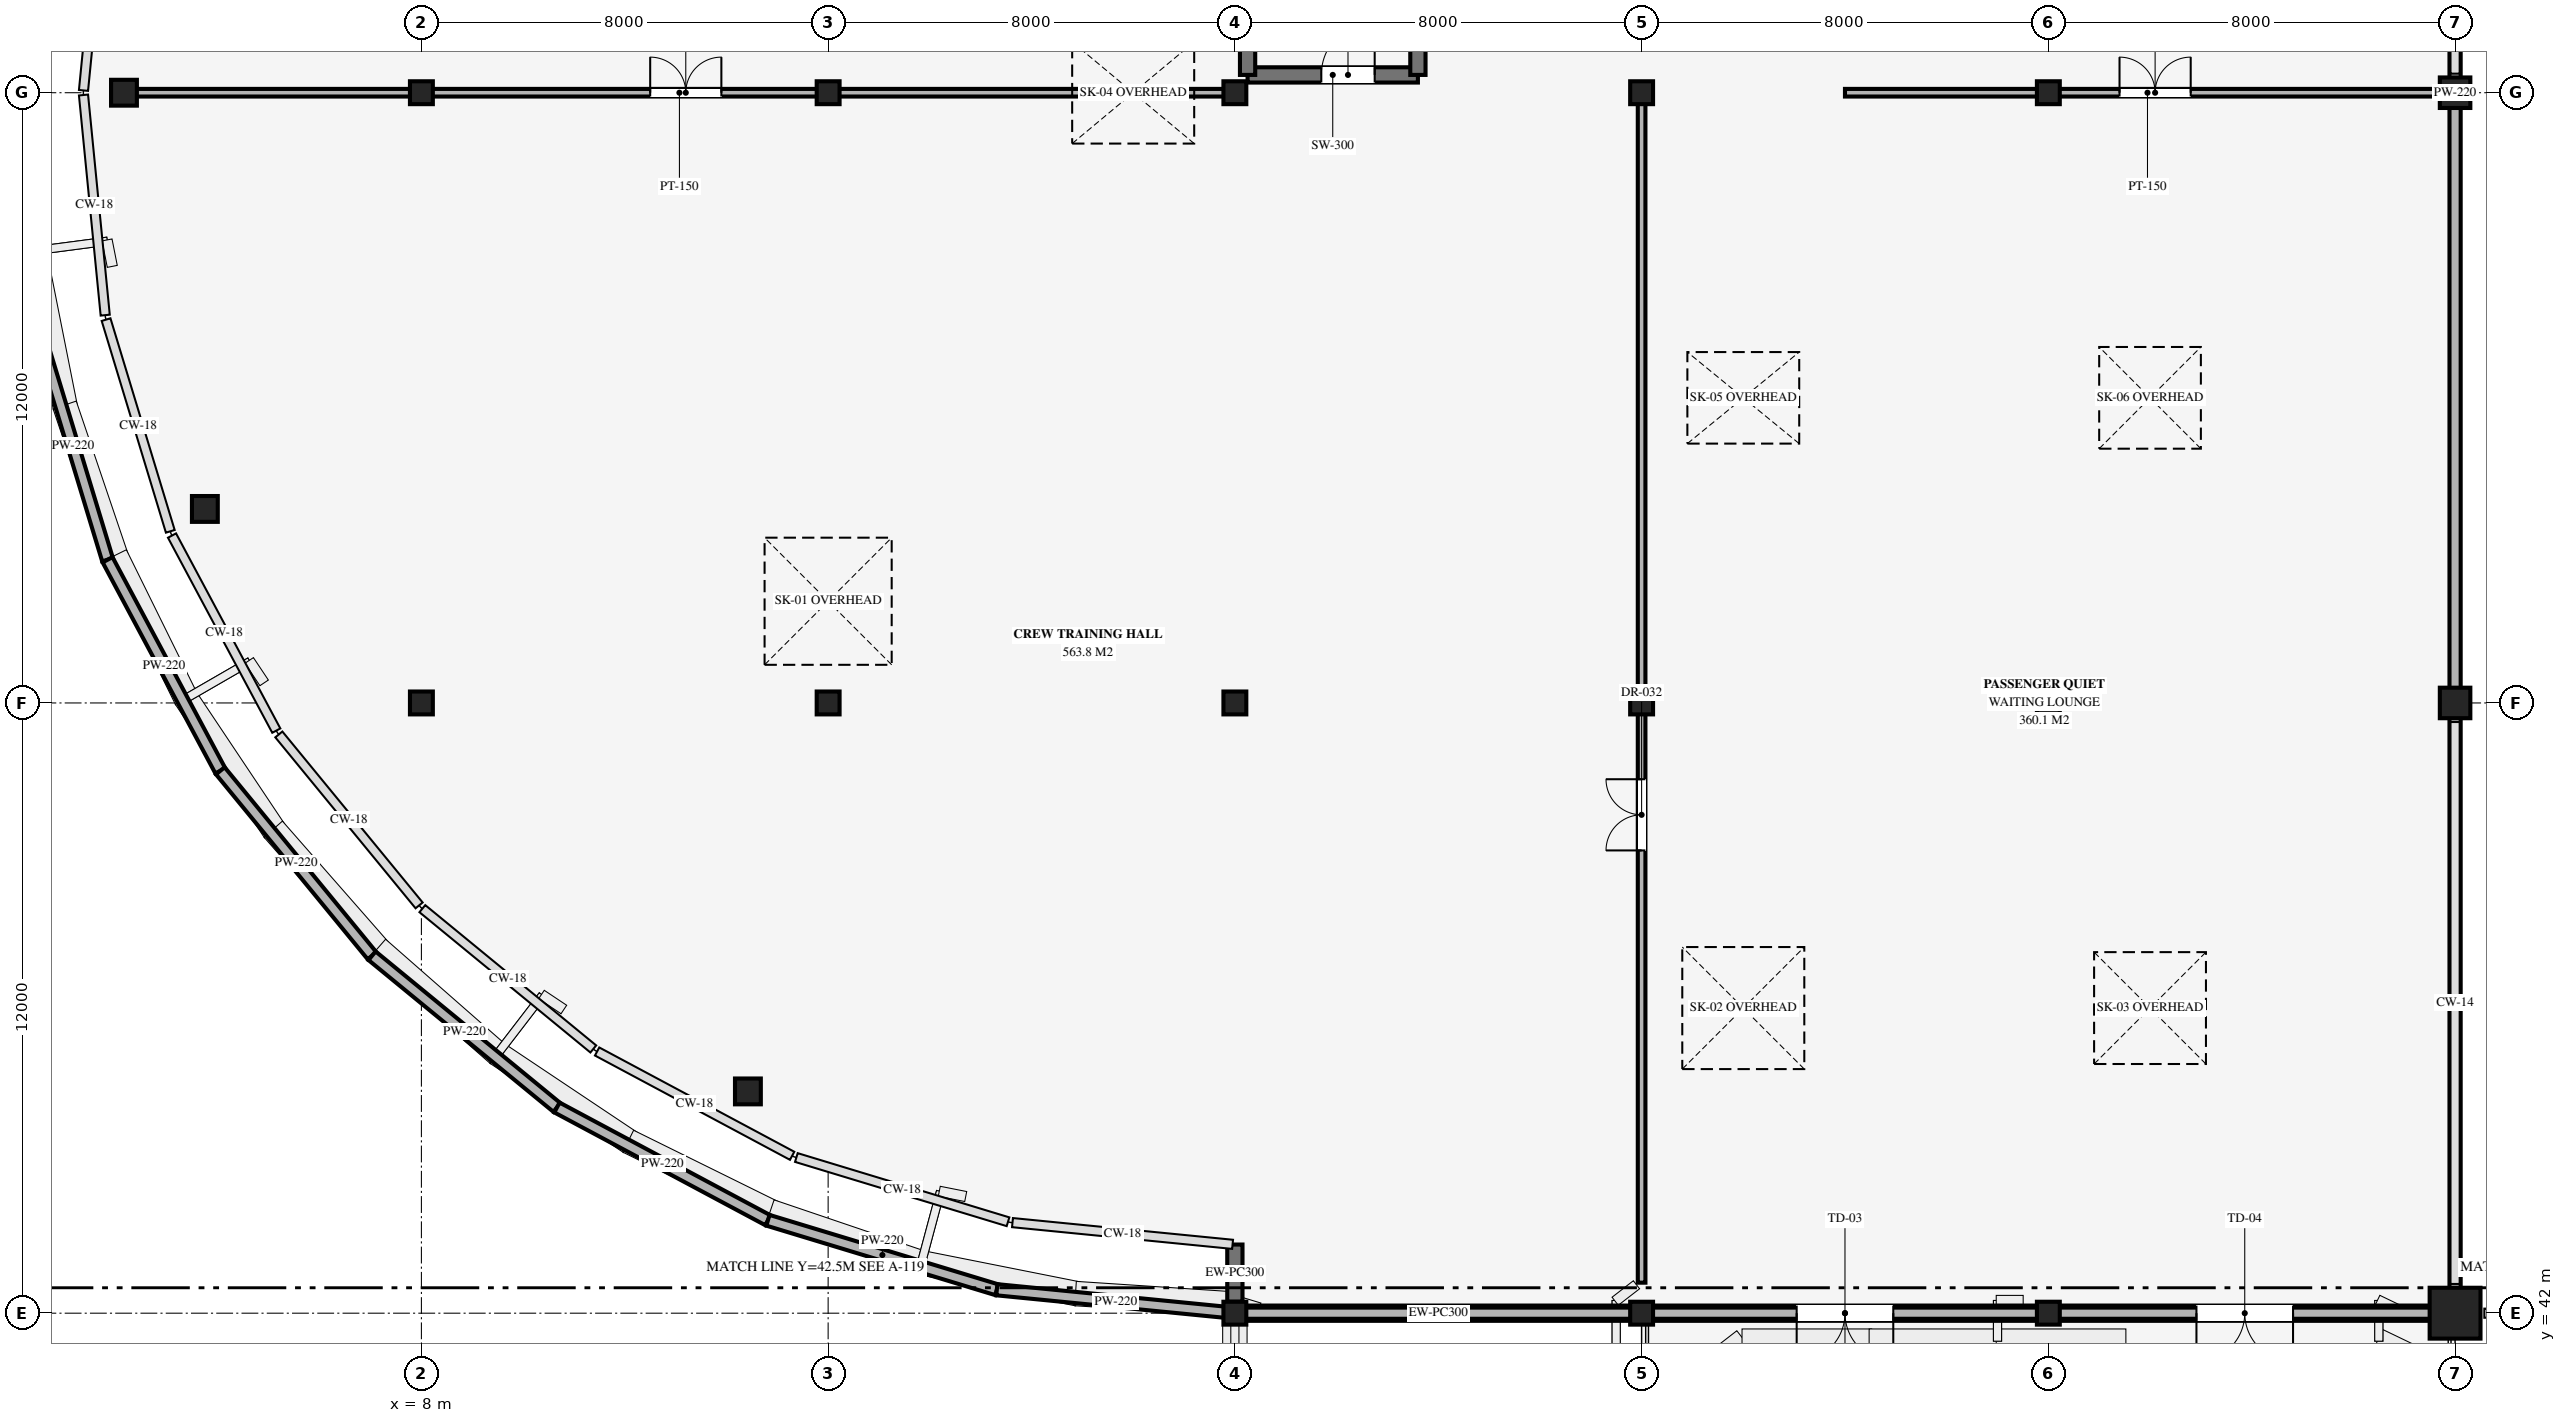
"""IFC4 building model, lengths in metres.
Left out: names, types, materials, properties, quantities, classifications, styles, units other than length and angle.
Written with IfcOpenShell. Run it as: python <this file> out.ifc"""

import sys

from ifc_helpers import new_model, si_unit, direction, frame, frame_2d, origin, origin_2d, place, context, subcontext, project, spatial, rectangle, circle, hollow_circle, extrude, element, fill, save


model = new_model("IFC4")
c1 = context("Model", 3, precision=1e-05, world=origin(), true_north=direction((0.0, 1.0)))
c2 = subcontext(c1, "Body", "Model", "MODEL_VIEW")
j1 = project(units=[si_unit("LENGTHUNIT", "METRE"), si_unit("PLANEANGLEUNIT", "RADIAN")], contexts=[c1])
p1 = place(None, origin())
s1 = spatial("IfcSite", under=j1, at=p1, CompositionType="ELEMENT")
p2 = place(p1, origin())
s2 = spatial("IfcBuilding", under=s1, at=p2, CompositionType="ELEMENT")
p3 = place(p2, frame((0.0, 0.0, 10.2)))
s3 = spatial("IfcBuildingStorey", under=s2, at=p3, CompositionType="ELEMENT", Elevation=10.2)
for number, where, z_axis, x_axis in (
    (1, (8.0, 54.0, 0.0), (0.0, 0.0, 1.0), (1.0, 0.0, 0.0)),
    (2, (8.0, 66.0, 0.0), (0.0, 0.0, 1.0), (1.0, 0.0, 0.0)),
    (3, (16.0, 54.0, 0.0), (0.0, 0.0, 1.0), (1.0, 0.0, 0.0)),
    (4, (16.0, 66.0, 0.0), (0.0, 0.0, 1.0), (1.0, 0.0, 0.0)),
    (5, (24.0, 42.0, 0.0), (0.0, 0.0, 1.0), (1.0, 0.0, 0.0)),
    (6, (24.0, 54.0, 0.0), (0.0, 0.0, 1.0), (1.0, 0.0, 0.0)),
    (7, (24.0, 66.0, 0.0), (0.0, 0.0, 1.0), (1.0, 0.0, 0.0)),
    (8, (32.0, 42.0, 0.0), (0.0, 0.0, 1.0), (1.0, 0.0, 0.0)),
    (9, (32.0, 54.0, 0.0), (0.0, 0.0, 1.0), (1.0, 0.0, 0.0)),
    (10, (32.0, 66.0, 0.0), (0.0, 0.0, 1.0), (1.0, 0.0, 0.0)),
    (11, (40.0, 42.0, 0.0), (0.0, 0.0, 1.0), (1.0, 0.0, 0.0)),
    (12, (40.0, 54.0, 0.0), (0.0, 0.0, 1.0), (1.0, 0.0, 0.0)),
    (13, (40.0, 66.0, 0.0), (0.0, 0.0, 1.0), (1.0, 0.0, 0.0)),
):
    element("IfcColumn", number, at=place(p3, frame(where, z_axis=z_axis, x_axis=x_axis)), inside=s3, PredefinedType="COLUMN", context=c2, shape_type="SweptSolid", body=[
        extrude(rectangle(XDim=0.45, YDim=0.45, at=origin_2d()), origin(), (0.0, 0.0, 1.0), 4.64),
    ])
p4 = place(p3, frame((48.0, 42.0, 0.0), z_axis=(0.0, 0.0, 1.0), x_axis=(1.0, 0.0, 0.0)))
e14 = element("IfcColumn", 14, at=p4, inside=s3, PredefinedType="COLUMN", context=c2, shape_type="SweptSolid", body=[
    extrude(rectangle(XDim=1.0, YDim=1.0, at=origin_2d()), origin(), (0.0, 0.0, 1.0), 4.8),
])
for number, where, z_axis, x_axis in (
    (15, (48.0, 54.0, 0.0), (0.0, 0.0, 1.0), (1.0, 0.0, 0.0)),
    (16, (48.0, 66.0, 0.0), (0.0, 0.0, 1.0), (1.0, 0.0, 0.0)),
):
    element("IfcColumn", number, at=place(p3, frame(where, z_axis=z_axis, x_axis=x_axis)), inside=s3, PredefinedType="COLUMN", context=c2, shape_type="SweptSolid", body=[
        extrude(circle(Radius=0.3, at=origin_2d()), origin(), (0.0, 0.0, 1.0), 4.64),
    ])
for number, where, z_axis, x_axis in (
    (17, (2.15, 66.0, 0.0), (0.0, 0.0, 1.0), (1.0, 0.0, 0.0)),
    (18, (3.741, 57.815, 0.0), (0.0, 0.0, 1.0), (1.0, 0.0, 0.0)),
    (19, (14.422, 46.361, 0.0), (0.0, 0.0, 1.0), (1.0, 0.0, 0.0)),
):
    element("IfcColumn", number, at=place(p3, frame(where, z_axis=z_axis, x_axis=x_axis)), inside=s3, PredefinedType="COLUMN", context=c2, shape_type="SweptSolid", body=[
        extrude(hollow_circle(Radius=0.254, WallThickness=0.02, at=origin_2d()), origin(), (0.0, 0.0, 1.0), 4.64),
    ])
p5 = place(p3, frame((24.0, 43.35, 0.0), z_axis=(0.0, 0.0, 1.0), x_axis=(0.0, -1.0, 0.0)))
e20 = element("IfcWall", 20, at=p5, inside=s3, PredefinedType="SOLIDWALL", context=c2, shape_type="SweptSolid", body=[
    extrude(rectangle(XDim=1.125, YDim=0.3, at=frame_2d((0.562, 0.0))), origin(), (0.0, 0.0, 1.0), 4.52),
])
p6 = place(p3, frame((31.775, 42.0, 0.0), z_axis=(0.0, 0.0, 1.0), x_axis=(-1.0, 0.0, 0.0)))
e21 = element("IfcWall", 21, at=p6, inside=s3, PredefinedType="SOLIDWALL", context=c2, shape_type="SweptSolid", body=[
    extrude(rectangle(XDim=7.55, YDim=0.3, at=frame_2d((3.775, 0.0))), origin(), (0.0, 0.0, 1.0), 4.52),
])
p7 = place(p3, frame((39.775, 42.0, 0.0), z_axis=(0.0, 0.0, 1.0), x_axis=(-1.0, 0.0, 0.0)))
e22 = element("IfcWall", 22, at=p7, inside=s3, PredefinedType="SOLIDWALL", context=c2, shape_type="SweptSolid", body=[
    extrude(rectangle(XDim=7.55, YDim=0.3, at=frame_2d((3.775, 0.0))), origin(), (0.0, 0.0, 1.0), 4.52),
])
p8 = place(p7, frame((2.825, 0.0, 0.0)))
e23 = element("IfcOpeningElement", 23, at=p8, cuts=e22, PredefinedType="OPENING", context=c2, shape_type="SweptSolid", body=[
    extrude(rectangle(XDim=1.9, YDim=2.2, at=frame_2d((0.95, 1.1))), frame((0.0, 0.16, 0.0), z_axis=(0.0, -1.0, 0.0), x_axis=(1.0, 0.0, 0.0)), (0.0, 0.0, 1.0), 0.32),
])
p9 = place(p3, frame((47.5, 42.0, 0.0), z_axis=(0.0, 0.0, 1.0), x_axis=(-1.0, 0.0, 0.0)))
e24 = element("IfcWall", 24, at=p9, inside=s3, PredefinedType="SOLIDWALL", context=c2, shape_type="SweptSolid", body=[
    extrude(rectangle(XDim=7.275, YDim=0.3, at=frame_2d((3.637, 0.0))), origin(), (0.0, 0.0, 1.0), 4.52),
])
p10 = place(p9, frame((2.687, 0.0, 0.0)))
e25 = element("IfcOpeningElement", 25, at=p10, cuts=e24, PredefinedType="OPENING", context=c2, shape_type="SweptSolid", body=[
    extrude(rectangle(XDim=1.9, YDim=2.2, at=frame_2d((0.95, 1.1))), frame((0.0, 0.16, 0.0), z_axis=(0.0, -1.0, 0.0), x_axis=(1.0, 0.0, 0.0)), (0.0, 0.0, 1.0), 0.32),
])
p11 = place(p3, frame((0.461, 61.318, 4.8), z_axis=(0.0, 0.0, 1.0), x_axis=(0.290331426072, -0.956926153386, 0.0)))
e26 = element("IfcWall", 26, at=p11, inside=s3, PredefinedType="PARAPET", context=c2, shape_type="SweptSolid", body=[
    extrude(rectangle(XDim=4.705, YDim=0.22, at=frame_2d((2.353, 0.0))), origin(), (0.0, 0.0, 1.0), 1.15),
])
p12 = place(p3, frame((1.827, 56.816, 4.8), z_axis=(0.0, 0.0, 1.0), x_axis=(0.471371704829, -0.881934643773, 0.0)))
e27 = element("IfcWall", 27, at=p12, inside=s3, PredefinedType="PARAPET", context=c2, shape_type="SweptSolid", body=[
    extrude(rectangle(XDim=4.706, YDim=0.22, at=frame_2d((2.353, 0.0))), origin(), (0.0, 0.0, 1.0), 1.15),
])
for number, where, z_axis, x_axis in (
    (28, (4.045, 52.666, 4.8), (0.0, 0.0, 1.0), (0.634, -0.773, 0.0)),
    (29, (7.029, 49.029, 4.8), (0.0, 0.0, 1.0), (0.773, -0.634, 0.0)),
):
    element("IfcWall", number, at=place(p3, frame(where, z_axis=z_axis, x_axis=x_axis)), inside=s3, PredefinedType="PARAPET", context=c2, shape_type="SweptSolid", body=[
        extrude(rectangle(XDim=4.705, YDim=0.22, at=frame_2d((2.352, 0.0))), origin(), (0.0, 0.0, 1.0), 1.15),
    ])
p13 = place(p3, frame((10.666, 46.045, 4.8), z_axis=(0.0, 0.0, 1.0), x_axis=(0.881934643773, -0.471371704829, 0.0)))
e30 = element("IfcWall", 30, at=p13, inside=s3, PredefinedType="PARAPET", context=c2, shape_type="SweptSolid", body=[
    extrude(rectangle(XDim=4.706, YDim=0.22, at=frame_2d((2.353, 0.0))), origin(), (0.0, 0.0, 1.0), 1.15),
])
p14 = place(p3, frame((14.816, 43.827, 4.8), z_axis=(0.0, 0.0, 1.0), x_axis=(0.956926153386, -0.290331426072, 0.0)))
e31 = element("IfcWall", 31, at=p14, inside=s3, PredefinedType="PARAPET", context=c2, shape_type="SweptSolid", body=[
    extrude(rectangle(XDim=4.705, YDim=0.22, at=frame_2d((2.353, 0.0))), origin(), (0.0, 0.0, 1.0), 1.15),
])
p15 = place(p3, frame((19.318, 42.461, 4.8), z_axis=(0.0, 0.0, 1.0), x_axis=(0.995188621889, -0.097977583466, 0.0)))
e32 = element("IfcWall", 32, at=p15, inside=s3, PredefinedType="PARAPET", context=c2, shape_type="SweptSolid", body=[
    extrude(rectangle(XDim=4.705, YDim=0.22, at=frame_2d((2.352, 0.0))), origin(), (0.0, 0.0, 1.0), 1.15),
])
p16 = place(p3, frame((24.0, 42.0, 4.8), z_axis=(0.0, 0.0, 1.0), x_axis=(1.0, 0.0, 0.0)))
e33 = element("IfcWall", 33, at=p16, inside=s3, PredefinedType="PARAPET", context=c2, shape_type="SweptSolid", body=[
    extrude(rectangle(XDim=24.0, YDim=0.22, at=frame_2d((12.0, 0.0))), origin(), (0.0, 0.0, 1.0), 1.15),
])
p17 = place(p3, frame((48.0, 42.0, 4.8), z_axis=(0.0, 0.0, 1.0), x_axis=(0.0, 1.0, 0.0)))
e34 = element("IfcWall", 34, at=p17, inside=s3, PredefinedType="PARAPET", context=c2, shape_type="SweptSolid", body=[
    extrude(rectangle(XDim=48.0, YDim=0.22, at=frame_2d((24.0, 0.0))), origin(), (0.0, 0.0, 1.0), 1.15),
])
p18 = place(p3, frame((24.25, 66.35, 0.0), z_axis=(0.0, 0.0, 1.0), x_axis=(1.0, 0.0, 0.0)))
e35 = element("IfcWall", 35, at=p18, inside=s3, PredefinedType="SHEAR", context=c2, shape_type="SweptSolid", body=[
    extrude(rectangle(XDim=3.35, YDim=0.3, at=frame_2d((1.675, 0.0))), origin(), (0.0, 0.0, 1.0), 4.78),
])
p19 = place(p18, frame((1.45, 0.0, 0.0)))
e36 = element("IfcOpeningElement", 36, at=p19, cuts=e35, PredefinedType="OPENING", context=c2, shape_type="SweptSolid", body=[
    extrude(rectangle(XDim=1.05, YDim=2.15, at=frame_2d((0.525, 1.075))), frame((0.0, 0.16, 0.0), z_axis=(0.0, -1.0, 0.0), x_axis=(1.0, 0.0, 0.0)), (0.0, 0.0, 1.0), 0.32),
])
for number, where, z_axis, x_axis in (
    (37, (24.25, 66.35, 0.0), (0.0, 0.0, 1.0), (0.0, 1.0, 0.0)),
    (38, (27.6, 66.35, 0.0), (0.0, 0.0, 1.0), (0.0, 1.0, 0.0)),
):
    element("IfcWall", number, at=place(p3, frame(where, z_axis=z_axis, x_axis=x_axis)), inside=s3, PredefinedType="SHEAR", context=c2, shape_type="SweptSolid", body=[
        extrude(rectangle(XDim=8.9, YDim=0.3, at=frame_2d((4.45, 0.0))), origin(), (0.0, 0.0, 1.0), 4.78),
    ])
p20 = place(p3, frame((32.0, 42.6, 0.0), z_axis=(0.0, 0.0, 1.0), x_axis=(0.0, 1.0, 0.0)))
e39 = element("IfcWall", 39, at=p20, inside=s3, PredefinedType="PARTITIONING", context=c2, shape_type="SweptSolid", body=[
    extrude(rectangle(XDim=23.4, YDim=0.15, at=frame_2d((11.7, 0.0))), origin(), (0.0, 0.0, 1.0), 3.65),
])
p21 = place(p20, frame((8.5, 0.0, 0.0)))
e40 = element("IfcOpeningElement", 40, at=p21, cuts=e39, PredefinedType="OPENING", context=c2, shape_type="SweptSolid", body=[
    extrude(rectangle(XDim=1.4, YDim=2.15, at=frame_2d((0.7, 1.075))), frame((0.0, 0.085, 0.0), z_axis=(0.0, -1.0, 0.0), x_axis=(1.0, 0.0, 0.0)), (0.0, 0.0, 1.0), 0.17),
])
p22 = place(p3, frame((2.0, 66.0, 0.0), z_axis=(0.0, 0.0, 1.0), x_axis=(1.0, 0.0, 0.0)))
e41 = element("IfcWall", 41, at=p22, inside=s3, PredefinedType="PARTITIONING", context=c2, shape_type="SweptSolid", body=[
    extrude(rectangle(XDim=22.15, YDim=0.15, at=frame_2d((11.075, 0.0))), origin(), (0.0, 0.0, 1.0), 3.65),
])
p23 = place(p22, frame((10.5, 0.0, 0.0)))
e42 = element("IfcOpeningElement", 42, at=p23, cuts=e41, PredefinedType="OPENING", context=c2, shape_type="SweptSolid", body=[
    extrude(rectangle(XDim=1.4, YDim=2.15, at=frame_2d((0.7, 1.075))), frame((0.0, 0.085, 0.0), z_axis=(0.0, -1.0, 0.0), x_axis=(1.0, 0.0, 0.0)), (0.0, 0.0, 1.0), 0.17),
])
p24 = place(p3, frame((36.0, 66.0, 0.0), z_axis=(0.0, 0.0, 1.0), x_axis=(1.0, 0.0, 0.0)))
e43 = element("IfcWall", 43, at=p24, inside=s3, PredefinedType="PARTITIONING", context=c2, shape_type="SweptSolid", body=[
    extrude(rectangle(XDim=11.9, YDim=0.15, at=frame_2d((5.95, 0.0))), origin(), (0.0, 0.0, 1.0), 3.65),
])
p25 = place(p24, frame((5.4, 0.0, 0.0)))
e44 = element("IfcOpeningElement", 44, at=p25, cuts=e43, PredefinedType="OPENING", context=c2, shape_type="SweptSolid", body=[
    extrude(rectangle(XDim=1.4, YDim=2.15, at=frame_2d((0.7, 1.075))), frame((0.0, 0.085, 0.0), z_axis=(0.0, -1.0, 0.0), x_axis=(1.0, 0.0, 0.0)), (0.0, 0.0, 1.0), 0.17),
])
p26 = place(p8, origin())
e45 = element("IfcDoor", 45, at=p26, inside=s3, OperationType="DOUBLE_DOOR_SINGLE_SWING", PredefinedType="DOOR", context=c2, shape_type="SweptSolid", body=[
    extrude(rectangle(XDim=1.9, YDim=2.2, at=frame_2d((0.95, 1.1))), frame((0.0, 0.025, 0.0), z_axis=(0.0, -1.0, 0.0), x_axis=(1.0, 0.0, 0.0)), (0.0, 0.0, 1.0), 0.05),
])
fill(e23, e45)
p27 = place(p10, origin())
e46 = element("IfcDoor", 46, at=p27, inside=s3, OperationType="DOUBLE_DOOR_SINGLE_SWING", PredefinedType="DOOR", context=c2, shape_type="SweptSolid", body=[
    extrude(rectangle(XDim=1.9, YDim=2.2, at=frame_2d((0.95, 1.1))), frame((0.0, 0.025, 0.0), z_axis=(0.0, -1.0, 0.0), x_axis=(1.0, 0.0, 0.0)), (0.0, 0.0, 1.0), 0.05),
])
fill(e25, e46)
p28 = place(p2, frame((0.0, 0.0, 27.9)))
p29 = place(p28, frame((0.0, 0.0, -13.14)))
p30 = place(p29, frame((16.0, 56.0, 0.0)))
p31 = place(p30, frame((0.0, 0.0, 0.19)))
e47 = element("IfcWindow", 47, at=p31, inside=s3, PartitioningType="SINGLE_PANEL", PredefinedType="SKYLIGHT", context=c2, shape_type="SweptSolid", body=[
    extrude(rectangle(XDim=2.5, YDim=2.5, at=origin_2d()), origin(), (0.0, 0.0, 1.0), 0.05),
])
p32 = place(p29, frame((34.0, 48.0, 0.0)))
p33 = place(p32, frame((0.0, 0.0, 0.19)))
e48 = element("IfcWindow", 48, at=p33, inside=s3, PartitioningType="SINGLE_PANEL", PredefinedType="SKYLIGHT", context=c2, shape_type="SweptSolid", body=[
    extrude(rectangle(XDim=2.4, YDim=2.4, at=origin_2d()), origin(), (0.0, 0.0, 1.0), 0.05),
])
p34 = place(p29, frame((42.0, 48.0, 0.0)))
p35 = place(p34, frame((0.0, 0.0, 0.19)))
e49 = element("IfcWindow", 49, at=p35, inside=s3, PartitioningType="SINGLE_PANEL", PredefinedType="SKYLIGHT", context=c2, shape_type="SweptSolid", body=[
    extrude(rectangle(XDim=2.2, YDim=2.2, at=origin_2d()), origin(), (0.0, 0.0, 1.0), 0.05),
])
p36 = place(p29, frame((22.0, 66.0, 0.0)))
p37 = place(p36, frame((0.0, 0.0, 0.19)))
e50 = element("IfcWindow", 50, at=p37, inside=s3, PartitioningType="SINGLE_PANEL", PredefinedType="SKYLIGHT", context=c2, shape_type="SweptSolid", body=[
    extrude(rectangle(XDim=2.4, YDim=2.0, at=origin_2d()), origin(), (0.0, 0.0, 1.0), 0.05),
])
p38 = place(p29, frame((34.0, 60.0, 0.0)))
p39 = place(p38, frame((0.0, 0.0, 0.19)))
e51 = element("IfcWindow", 51, at=p39, inside=s3, PartitioningType="SINGLE_PANEL", PredefinedType="SKYLIGHT", context=c2, shape_type="SweptSolid", body=[
    extrude(rectangle(XDim=2.2, YDim=1.8, at=origin_2d()), origin(), (0.0, 0.0, 1.0), 0.05),
])
p40 = place(p29, frame((42.0, 60.0, 0.0)))
p41 = place(p40, frame((0.0, 0.0, 0.19)))
e52 = element("IfcWindow", 52, at=p41, inside=s3, PartitioningType="SINGLE_PANEL", PredefinedType="SKYLIGHT", context=c2, shape_type="SweptSolid", body=[
    extrude(rectangle(XDim=2.0, YDim=2.0, at=origin_2d()), origin(), (0.0, 0.0, 1.0), 0.05),
])
p42 = place(p19, origin())
e53 = element("IfcDoor", 53, at=p42, inside=s3, OperationType="SINGLE_SWING_RIGHT", PredefinedType="DOOR", context=c2, shape_type="SweptSolid", body=[
    extrude(rectangle(XDim=1.05, YDim=2.15, at=frame_2d((0.525, 1.075))), frame((0.0, 0.025, 0.0), z_axis=(0.0, -1.0, 0.0), x_axis=(1.0, 0.0, 0.0)), (0.0, 0.0, 1.0), 0.05),
])
fill(e36, e53)
p43 = place(p21, origin())
e54 = element("IfcDoor", 54, at=p43, inside=s3, OperationType="DOUBLE_DOOR_SINGLE_SWING", PredefinedType="DOOR", context=c2, shape_type="SweptSolid", body=[
    extrude(rectangle(XDim=1.4, YDim=2.15, at=frame_2d((0.7, 1.075))), frame((0.0, 0.025, 0.0), z_axis=(0.0, -1.0, 0.0), x_axis=(1.0, 0.0, 0.0)), (0.0, 0.0, 1.0), 0.05),
])
fill(e40, e54)
p44 = place(p23, origin())
e55 = element("IfcDoor", 55, at=p44, inside=s3, OperationType="DOUBLE_DOOR_SINGLE_SWING", PredefinedType="DOOR", context=c2, shape_type="SweptSolid", body=[
    extrude(rectangle(XDim=1.4, YDim=2.15, at=frame_2d((0.7, 1.075))), frame((0.0, 0.025, 0.0), z_axis=(0.0, -1.0, 0.0), x_axis=(1.0, 0.0, 0.0)), (0.0, 0.0, 1.0), 0.05),
])
fill(e42, e55)
p45 = place(p25, origin())
e56 = element("IfcDoor", 56, at=p45, inside=s3, OperationType="DOUBLE_DOOR_SINGLE_SWING", PredefinedType="DOOR", context=c2, shape_type="SweptSolid", body=[
    extrude(rectangle(XDim=1.4, YDim=2.15, at=frame_2d((0.7, 1.075))), frame((0.0, 0.025, 0.0), z_axis=(0.0, -1.0, 0.0), x_axis=(1.0, 0.0, 0.0)), (0.0, 0.0, 1.0), 0.05),
])
fill(e44, e56)
save(model, sys.argv[1])
